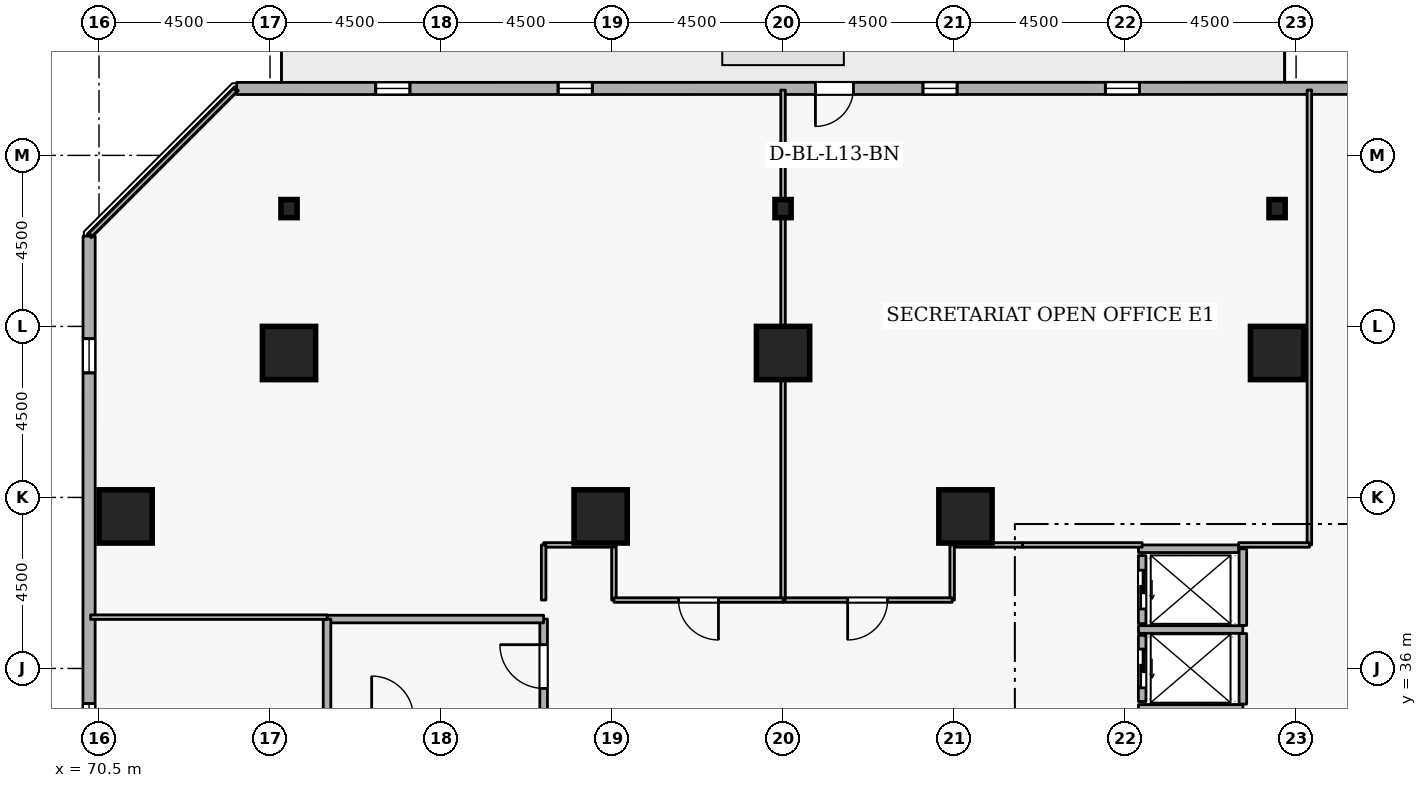
"""IFC4 building model, lengths in metres.
Left out: names, types, materials, properties, quantities, classifications, styles, units other than length and angle.
Written with IfcOpenShell. Run it as: python <this file> out.ifc"""

import sys

from ifc_helpers import new_model, si_unit, direction, frame, frame_2d, origin, origin_2d, place, context, subcontext, project, spatial, rectangle, i_section, extrude, element, fill, save


model = new_model("IFC4")
c1 = context("Model", 3, precision=1e-05, world=origin(), true_north=direction((0.0, 1.0)))
c2 = subcontext(c1, "Body", "Model", "MODEL_VIEW")
j1 = project(units=[si_unit("LENGTHUNIT", "METRE"), si_unit("PLANEANGLEUNIT", "RADIAN")], contexts=[c1])
p1 = place(None, origin())
s1 = spatial("IfcSite", under=j1, at=p1, CompositionType="ELEMENT")
p2 = place(p1, origin())
s2 = spatial("IfcBuilding", under=s1, at=p2, CompositionType="ELEMENT")
p3 = place(p2, frame((0.0, 0.0, 53.7)))
s3 = spatial("IfcBuildingStorey", under=s2, at=p3, CompositionType="ELEMENT", Elevation=53.7)
for number, where, z_axis, x_axis in (
    (1, (101.5, 44.3, 0.0), (0.0, 0.0, 1.0), (1.0, 0.0, 0.0)),
    (2, (88.5, 44.3, 0.0), (0.0, 0.0, 1.0), (1.0, 0.0, 0.0)),
    (3, (75.5, 44.3, 0.0), (0.0, 0.0, 1.0), (1.0, 0.0, 0.0)),
    (4, (71.2, 40.0, 0.0), (0.0, 0.0, 1.0), (1.0, 0.0, 0.0)),
    (5, (93.3, 40.0, 0.0), (0.0, 0.0, 1.0), (1.0, 0.0, 0.0)),
    (6, (83.7, 40.0, 0.0), (0.0, 0.0, 1.0), (1.0, 0.0, 0.0)),
):
    element("IfcColumn", number, at=place(p3, frame(where, z_axis=z_axis, x_axis=x_axis)), inside=s3, PredefinedType="COLUMN", context=c2, shape_type="SweptSolid", body=[
        extrude(rectangle(XDim=1.4, YDim=1.4, at=origin_2d()), origin(), (0.0, 0.0, 1.0), 3.6),
    ])
for number, where, z_axis, x_axis in (
    (7, (101.5, 48.1, 0.0), (0.0, 0.0, 1.0), (1.0, 0.0, 0.0)),
    (8, (88.5, 48.1, 0.0), (0.0, 0.0, 1.0), (1.0, 0.0, 0.0)),
    (9, (75.5, 48.1, 0.0), (0.0, 0.0, 1.0), (1.0, 0.0, 0.0)),
):
    element("IfcColumn", number, at=place(p3, frame(where, z_axis=z_axis, x_axis=x_axis)), inside=s3, PredefinedType="COLUMN", context=c2, shape_type="SweptSolid", body=[
        extrude(i_section(OverallWidth=0.424, OverallDepth=0.475, WebThickness=0.048, FlangeThickness=0.077, FilletRadius=0.015, at=origin_2d()), origin(), (0.0, 0.0, 1.0), 3.6),
    ])
p4 = place(p3, frame((110.181, 51.265, 0.0), z_axis=(0.0, 0.0, 1.0), x_axis=(-0.999999992574, -0.000121872777, 0.0)))
e10 = element("IfcWall", 10, at=p4, inside=s3, PredefinedType="STANDARD", context=c2, shape_type="SweptSolid", body=[
    extrude(rectangle(XDim=36.058, YDim=0.32, at=frame_2d((18.029, 0.0))), origin(), (0.0, 0.0, 1.0), 2.7),
])
p5 = place(p4, frame((19.829, 0.0, 0.0)))
e11 = element("IfcOpeningElement", 11, at=p5, cuts=e10, PredefinedType="OPENING", context=c2, shape_type="SweptSolid", body=[
    extrude(rectangle(XDim=1.0, YDim=2.08, at=frame_2d((0.5, 1.04))), frame((0.0, 0.17, 0.0), z_axis=(0.0, -1.0, 0.0), x_axis=(1.0, 0.0, 0.0)), (0.0, 0.0, 1.0), 0.34),
])
p6 = place(p4, frame((2.7, 0.0, 0.72)))
e12 = element("IfcOpeningElement", 12, at=p6, cuts=e10, PredefinedType="OPENING", context=c2, shape_type="SweptSolid", body=[
    extrude(rectangle(XDim=0.9, YDim=1.75, at=frame_2d((0.45, 0.875))), frame((0.0, 0.17, 0.0), z_axis=(0.0, -1.0, 0.0), x_axis=(1.0, 0.0, 0.0)), (0.0, 0.0, 1.0), 0.34),
])
p7 = place(p4, frame((12.3, 0.0, 0.72)))
e13 = element("IfcOpeningElement", 13, at=p7, cuts=e10, PredefinedType="OPENING", context=c2, shape_type="SweptSolid", body=[
    extrude(rectangle(XDim=0.9, YDim=1.75, at=frame_2d((0.45, 0.875))), frame((0.0, 0.17, 0.0), z_axis=(0.0, -1.0, 0.0), x_axis=(1.0, 0.0, 0.0)), (0.0, 0.0, 1.0), 0.34),
])
p8 = place(p4, frame((17.1, 0.0, 0.72)))
e14 = element("IfcOpeningElement", 14, at=p8, cuts=e10, PredefinedType="OPENING", context=c2, shape_type="SweptSolid", body=[
    extrude(rectangle(XDim=0.9, YDim=1.75, at=frame_2d((0.45, 0.875))), frame((0.0, 0.17, 0.0), z_axis=(0.0, -1.0, 0.0), x_axis=(1.0, 0.0, 0.0)), (0.0, 0.0, 1.0), 0.34),
])
p9 = place(p4, frame((26.7, 0.0, 0.72)))
e15 = element("IfcOpeningElement", 15, at=p9, cuts=e10, PredefinedType="OPENING", context=c2, shape_type="SweptSolid", body=[
    extrude(rectangle(XDim=0.9, YDim=1.75, at=frame_2d((0.45, 0.875))), frame((0.0, 0.17, 0.0), z_axis=(0.0, -1.0, 0.0), x_axis=(1.0, 0.0, 0.0)), (0.0, 0.0, 1.0), 0.34),
])
p10 = place(p4, frame((31.5, 0.0, 0.72)))
e16 = element("IfcOpeningElement", 16, at=p10, cuts=e10, PredefinedType="OPENING", context=c2, shape_type="SweptSolid", body=[
    extrude(rectangle(XDim=0.9, YDim=1.75, at=frame_2d((0.45, 0.875))), frame((0.0, 0.17, 0.0), z_axis=(0.0, -1.0, 0.0), x_axis=(1.0, 0.0, 0.0)), (0.0, 0.0, 1.0), 0.34),
])
p11 = place(p3, frame((70.24, 47.377, 0.0), z_axis=(0.0, 0.0, 1.0), x_axis=(-0.000121872777, -0.999999992574, 0.0)))
e17 = element("IfcWall", 17, at=p11, inside=s3, PredefinedType="STANDARD", context=c2, shape_type="SweptSolid", body=[
    extrude(rectangle(XDim=36.058, YDim=0.32, at=frame_2d((18.029, 0.0))), origin(), (0.0, 0.0, 1.0), 2.7),
])
p12 = place(p11, frame((2.7, 0.0, 0.72)))
e18 = element("IfcOpeningElement", 18, at=p12, cuts=e17, PredefinedType="OPENING", context=c2, shape_type="SweptSolid", body=[
    extrude(rectangle(XDim=0.9, YDim=1.75, at=frame_2d((0.45, 0.875))), frame((0.0, 0.17, 0.0), z_axis=(0.0, -1.0, 0.0), x_axis=(1.0, 0.0, 0.0)), (0.0, 0.0, 1.0), 0.34),
])
p13 = place(p11, frame((12.3, 0.0, 0.72)))
e19 = element("IfcOpeningElement", 19, at=p13, cuts=e17, PredefinedType="OPENING", context=c2, shape_type="SweptSolid", body=[
    extrude(rectangle(XDim=0.9, YDim=1.75, at=frame_2d((0.45, 0.875))), frame((0.0, 0.17, 0.0), z_axis=(0.0, -1.0, 0.0), x_axis=(1.0, 0.0, 0.0)), (0.0, 0.0, 1.0), 0.34),
])
p14 = place(p11, frame((17.1, 0.0, 0.72)))
e20 = element("IfcOpeningElement", 20, at=p14, cuts=e17, PredefinedType="OPENING", context=c2, shape_type="SweptSolid", body=[
    extrude(rectangle(XDim=0.9, YDim=1.75, at=frame_2d((0.45, 0.875))), frame((0.0, 0.17, 0.0), z_axis=(0.0, -1.0, 0.0), x_axis=(1.0, 0.0, 0.0)), (0.0, 0.0, 1.0), 0.34),
])
p15 = place(p11, frame((21.9, 0.0, 0.72)))
e21 = element("IfcOpeningElement", 21, at=p15, cuts=e17, PredefinedType="OPENING", context=c2, shape_type="SweptSolid", body=[
    extrude(rectangle(XDim=0.9, YDim=1.75, at=frame_2d((0.45, 0.875))), frame((0.0, 0.17, 0.0), z_axis=(0.0, -1.0, 0.0), x_axis=(1.0, 0.0, 0.0)), (0.0, 0.0, 1.0), 0.34),
])
p16 = place(p11, frame((26.7, 0.0, 0.72)))
e22 = element("IfcOpeningElement", 22, at=p16, cuts=e17, PredefinedType="OPENING", context=c2, shape_type="SweptSolid", body=[
    extrude(rectangle(XDim=0.9, YDim=1.75, at=frame_2d((0.45, 0.875))), frame((0.0, 0.17, 0.0), z_axis=(0.0, -1.0, 0.0), x_axis=(1.0, 0.0, 0.0)), (0.0, 0.0, 1.0), 0.34),
])
p17 = place(p3, frame((97.95, 36.87, 0.0), z_axis=(0.0, 0.0, 1.0), x_axis=(0.0, -1.0, 0.0)))
e23 = element("IfcWall", 23, at=p17, inside=s3, PredefinedType="STANDARD", context=c2, shape_type="SweptSolid", body=[
    extrude(rectangle(XDim=1.74, YDim=0.2, at=frame_2d((0.87, 0.0))), origin(), (0.0, 0.0, 1.0), 3.34),
])
p18 = place(p17, frame((0.36, 0.0, 0.0)))
e24 = element("IfcOpeningElement", 24, at=p18, cuts=e23, PredefinedType="OPENING", context=c2, shape_type="SweptSolid", body=[
    extrude(rectangle(XDim=1.02, YDim=2.06, at=frame_2d((0.51, 1.03))), frame((0.0, 0.11, 0.0), z_axis=(0.0, -1.0, 0.0), x_axis=(1.0, 0.0, 0.0)), (0.0, 0.0, 1.0), 0.22),
])
p19 = place(p3, frame((97.95, 38.97, 0.0), z_axis=(0.0, 0.0, 1.0), x_axis=(0.0, -1.0, 0.0)))
e25 = element("IfcWall", 25, at=p19, inside=s3, PredefinedType="STANDARD", context=c2, shape_type="SweptSolid", body=[
    extrude(rectangle(XDim=1.79, YDim=0.2, at=frame_2d((0.895, 0.0))), origin(), (0.0, 0.0, 1.0), 3.34),
])
p20 = place(p19, frame((0.385, 0.0, 0.0)))
e26 = element("IfcOpeningElement", 26, at=p20, cuts=e25, PredefinedType="OPENING", context=c2, shape_type="SweptSolid", body=[
    extrude(rectangle(XDim=1.02, YDim=2.06, at=frame_2d((0.51, 1.03))), frame((0.0, 0.11, 0.0), z_axis=(0.0, -1.0, 0.0), x_axis=(1.0, 0.0, 0.0)), (0.0, 0.0, 1.0), 0.22),
])
for number, where, z_axis, x_axis in (
    (27, (97.852, 37.025, 0.0), (0.0, 0.0, 1.0), (1.0, 0.0, 0.0)),
    (28, (97.852, 34.95, 0.0), (0.0, 0.0, 1.0), (1.0, 0.0, 0.0)),
):
    element("IfcWall", number, at=place(p3, frame(where, z_axis=z_axis, x_axis=x_axis)), inside=s3, PredefinedType="STANDARD", context=c2, shape_type="SweptSolid", body=[
        extrude(rectangle(XDim=2.746, YDim=0.2, at=frame_2d((1.373, 0.0))), origin(), (0.0, 0.0, 1.0), 3.34),
    ])
p21 = place(p3, frame((100.6, 35.062, 0.0), z_axis=(0.0, 0.0, 1.0), x_axis=(0.0, 1.0, 0.0)))
e29 = element("IfcWall", 29, at=p21, inside=s3, PredefinedType="STANDARD", context=c2, shape_type="SweptSolid", body=[
    extrude(rectangle(XDim=1.856, YDim=0.2, at=frame_2d((0.928, 0.0))), origin(), (0.0, 0.0, 1.0), 3.34),
])
p22 = place(p3, frame((100.6, 37.132, 0.0), z_axis=(0.0, 0.0, 1.0), x_axis=(0.0, 1.0, 0.0)))
e30 = element("IfcWall", 30, at=p22, inside=s3, PredefinedType="STANDARD", context=c2, shape_type="SweptSolid", body=[
    extrude(rectangle(XDim=2.016, YDim=0.2, at=frame_2d((1.008, 0.0))), origin(), (0.0, 0.0, 1.0), 3.34),
])
p23 = place(p3, frame((97.852, 39.15, 0.0), z_axis=(0.0, 0.0, 1.0), x_axis=(1.0, 0.0, 0.0)))
e31 = element("IfcWall", 31, at=p23, inside=s3, PredefinedType="STANDARD", context=c2, shape_type="SweptSolid", body=[
    extrude(rectangle(XDim=2.636, YDim=0.2, at=frame_2d((1.318, 0.0))), origin(), (0.0, 0.0, 1.0), 3.34),
])
p24 = place(p3, frame((82.2, 34.8, 0.0), z_axis=(0.0, 0.0, 1.0), x_axis=(0.0, 1.0, 0.0)))
e32 = element("IfcWall", 32, at=p24, inside=s3, PredefinedType="STANDARD", context=c2, shape_type="SweptSolid", body=[
    extrude(rectangle(XDim=2.5, YDim=0.2, at=frame_2d((1.25, 0.0))), origin(), (0.0, 0.0, 1.0), 3.34),
])
p25 = place(p24, frame((0.675, 0.0, 0.0)))
e33 = element("IfcOpeningElement", 33, at=p25, cuts=e32, PredefinedType="OPENING", context=c2, shape_type="SweptSolid", body=[
    extrude(rectangle(XDim=1.15, YDim=2.1, at=frame_2d((0.575, 1.05))), frame((0.0, 0.11, 0.0), z_axis=(0.0, -1.0, 0.0), x_axis=(1.0, 0.0, 0.0)), (0.0, 0.0, 1.0), 0.22),
])
p26 = place(p3, frame((82.2, 37.3, 0.0), z_axis=(0.0, 0.0, 1.0), x_axis=(-1.0, 0.0, 0.0)))
e34 = element("IfcWall", 34, at=p26, inside=s3, PredefinedType="STANDARD", context=c2, shape_type="SweptSolid", body=[
    extrude(rectangle(XDim=5.7, YDim=0.2, at=frame_2d((2.85, 0.0))), origin(), (0.0, 0.0, 1.0), 3.34),
])
p27 = place(p3, frame((76.5, 37.3, 0.0), z_axis=(0.0, 0.0, 1.0), x_axis=(0.0, -1.0, 0.0)))
e35 = element("IfcWall", 35, at=p27, inside=s3, PredefinedType="STANDARD", context=c2, shape_type="SweptSolid", body=[
    extrude(rectangle(XDim=2.5, YDim=0.2, at=frame_2d((1.25, 0.0))), origin(), (0.0, 0.0, 1.0), 3.34),
])
p28 = place(p3, frame((97.95, 39.25, 0.0), z_axis=(0.0, 0.0, 1.0), x_axis=(-1.0, 0.0, 0.0)))
e36 = element("IfcWall", 36, at=p28, inside=s3, PredefinedType="PARTITIONING", context=c2, shape_type="SweptSolid", body=[
    extrude(rectangle(XDim=3.15, YDim=0.12, at=frame_2d((1.575, 0.0))), origin(), (0.0, 0.0, 1.0), 3.34),
])
p29 = place(p3, frame((94.8, 39.25, 0.0), z_axis=(0.0, 0.0, 1.0), x_axis=(-1.0, 0.0, 0.0)))
e37 = element("IfcWall", 37, at=p29, inside=s3, PredefinedType="PARTITIONING", context=c2, shape_type="SweptSolid", body=[
    extrude(rectangle(XDim=1.85, YDim=0.12, at=frame_2d((0.925, 0.0))), origin(), (0.0, 0.0, 1.0), 3.34),
])
p30 = place(p3, frame((92.95, 39.25, 0.0), z_axis=(0.0, 0.0, 1.0), x_axis=(0.0, -1.0, 0.0)))
e38 = element("IfcWall", 38, at=p30, inside=s3, PredefinedType="PARTITIONING", context=c2, shape_type="SweptSolid", body=[
    extrude(rectangle(XDim=1.45, YDim=0.12, at=frame_2d((0.725, 0.0))), origin(), (0.0, 0.0, 1.0), 3.34),
])
p31 = place(p3, frame((92.95, 37.8, 0.0), z_axis=(0.0, 0.0, 1.0), x_axis=(-1.0, 0.0, 0.0)))
e39 = element("IfcWall", 39, at=p31, inside=s3, PredefinedType="PARTITIONING", context=c2, shape_type="SweptSolid", body=[
    extrude(rectangle(XDim=4.45, YDim=0.12, at=frame_2d((2.225, 0.0))), origin(), (0.0, 0.0, 1.0), 3.34),
])
p32 = place(p31, frame((1.7, 0.0, 0.0)))
e40 = element("IfcOpeningElement", 40, at=p32, cuts=e39, PredefinedType="OPENING", context=c2, shape_type="SweptSolid", body=[
    extrude(rectangle(XDim=1.05, YDim=2.1, at=frame_2d((0.525, 1.05))), frame((0.0, 0.07, 0.0), z_axis=(0.0, -1.0, 0.0), x_axis=(1.0, 0.0, 0.0)), (0.0, 0.0, 1.0), 0.14),
])
p33 = place(p3, frame((88.5, 37.8, 0.0), z_axis=(0.0, 0.0, 1.0), x_axis=(0.0, 1.0, 0.0)))
e41 = element("IfcWall", 41, at=p33, inside=s3, PredefinedType="PARTITIONING", context=c2, shape_type="SweptSolid", body=[
    extrude(rectangle(XDim=13.42, YDim=0.12, at=frame_2d((6.71, 0.0))), origin(), (0.0, 0.0, 1.0), 2.932),
])
p34 = place(p3, frame((102.35, 51.22, 0.0), z_axis=(0.0, 0.0, 1.0), x_axis=(0.0, -1.0, 0.0)))
e42 = element("IfcWall", 42, at=p34, inside=s3, PredefinedType="PARTITIONING", context=c2, shape_type="SweptSolid", body=[
    extrude(rectangle(XDim=11.97, YDim=0.12, at=frame_2d((5.985, 0.0))), origin(), (0.0, 0.0, 1.0), 3.34),
])
p35 = place(p3, frame((102.35, 39.25, 0.0), z_axis=(0.0, 0.0, 1.0), x_axis=(-1.0, 0.0, 0.0)))
e43 = element("IfcWall", 43, at=p35, inside=s3, PredefinedType="PARTITIONING", context=c2, shape_type="SweptSolid", body=[
    extrude(rectangle(XDim=1.862, YDim=0.12, at=frame_2d((0.931, 0.0))), origin(), (0.0, 0.0, 1.0), 3.34),
])
p36 = place(p3, frame((84.05, 37.8, 0.0), z_axis=(0.0, 0.0, 1.0), x_axis=(0.0, 1.0, 0.0)))
e44 = element("IfcWall", 44, at=p36, inside=s3, PredefinedType="PARTITIONING", context=c2, shape_type="SweptSolid", body=[
    extrude(rectangle(XDim=1.45, YDim=0.12, at=frame_2d((0.725, 0.0))), origin(), (0.0, 0.0, 1.0), 3.34),
])
p37 = place(p3, frame((84.05, 39.25, 0.0), z_axis=(0.0, 0.0, 1.0), x_axis=(-1.0, 0.0, 0.0)))
e45 = element("IfcWall", 45, at=p37, inside=s3, PredefinedType="PARTITIONING", context=c2, shape_type="SweptSolid", body=[
    extrude(rectangle(XDim=1.85, YDim=0.12, at=frame_2d((0.925, 0.0))), origin(), (0.0, 0.0, 1.0), 3.34),
])
p38 = place(p3, frame((82.2, 39.25, 0.0), z_axis=(0.0, 0.0, 1.0), x_axis=(0.0, -1.0, 0.0)))
e46 = element("IfcWall", 46, at=p38, inside=s3, PredefinedType="PARTITIONING", context=c2, shape_type="SweptSolid", body=[
    extrude(rectangle(XDim=1.45, YDim=0.12, at=frame_2d((0.725, 0.0))), origin(), (0.0, 0.0, 1.0), 3.34),
])
p39 = place(p3, frame((76.5, 37.35, 0.0), z_axis=(0.0, 0.0, 1.0), x_axis=(-1.0, 0.0, 0.0)))
e47 = element("IfcWall", 47, at=p39, inside=s3, PredefinedType="PARTITIONING", context=c2, shape_type="SweptSolid", body=[
    extrude(rectangle(XDim=6.22, YDim=0.12, at=frame_2d((3.11, 0.0))), origin(), (0.0, 0.0, 1.0), 3.34),
])
p40 = place(p3, frame((70.28, 47.417, 0.0), z_axis=(0.0, 0.0, 1.0), x_axis=(0.707106781187, 0.707106781187, 0.0)))
e48 = element("IfcWall", 48, at=p40, inside=s3, PredefinedType="PARTITIONING", context=c2, shape_type="SweptSolid", body=[
    extrude(rectangle(XDim=5.379, YDim=0.12, at=frame_2d((2.689, 0.0))), origin(), (0.0, 0.0, 1.0), 3.34),
])
p41 = place(p3, frame((88.5, 37.8, 0.0), z_axis=(0.0, 0.0, 1.0), x_axis=(-1.0, 0.0, 0.0)))
e49 = element("IfcWall", 49, at=p41, inside=s3, PredefinedType="PARTITIONING", context=c2, shape_type="SweptSolid", body=[
    extrude(rectangle(XDim=4.45, YDim=0.12, at=frame_2d((2.225, 0.0))), origin(), (0.0, 0.0, 1.0), 3.34),
])
p42 = place(p41, frame((1.7, 0.0, 0.0)))
e50 = element("IfcOpeningElement", 50, at=p42, cuts=e49, PredefinedType="OPENING", context=c2, shape_type="SweptSolid", body=[
    extrude(rectangle(XDim=1.05, YDim=2.1, at=frame_2d((0.525, 1.05))), frame((0.0, 0.07, 0.0), z_axis=(0.0, -1.0, 0.0), x_axis=(1.0, 0.0, 0.0)), (0.0, 0.0, 1.0), 0.14),
])
p43 = place(p5, origin())
e51 = element("IfcDoor", 51, at=p43, inside=s3, OperationType="SINGLE_SWING_RIGHT", PredefinedType="DOOR", context=c2, shape_type="SweptSolid", body=[
    extrude(rectangle(XDim=1.0, YDim=2.08, at=frame_2d((0.5, 1.04))), frame((0.0, 0.025, 0.0), z_axis=(0.0, -1.0, 0.0), x_axis=(1.0, 0.0, 0.0)), (0.0, 0.0, 1.0), 0.05),
])
fill(e11, e51)
p44 = place(p7, origin())
e52 = element("IfcWindow", 52, at=p44, inside=s3, PartitioningType="SINGLE_PANEL", PredefinedType="WINDOW", context=c2, shape_type="SweptSolid", body=[
    extrude(rectangle(XDim=0.9, YDim=1.75, at=frame_2d((0.45, 0.875))), frame((0.0, 0.03, 0.0), z_axis=(0.0, -1.0, 0.0), x_axis=(1.0, 0.0, 0.0)), (0.0, 0.0, 1.0), 0.06),
])
fill(e13, e52)
p45 = place(p8, origin())
e53 = element("IfcWindow", 53, at=p45, inside=s3, PartitioningType="SINGLE_PANEL", PredefinedType="WINDOW", context=c2, shape_type="SweptSolid", body=[
    extrude(rectangle(XDim=0.9, YDim=1.75, at=frame_2d((0.45, 0.875))), frame((0.0, 0.03, 0.0), z_axis=(0.0, -1.0, 0.0), x_axis=(1.0, 0.0, 0.0)), (0.0, 0.0, 1.0), 0.06),
])
fill(e14, e53)
p46 = place(p9, origin())
e54 = element("IfcWindow", 54, at=p46, inside=s3, PartitioningType="SINGLE_PANEL", PredefinedType="WINDOW", context=c2, shape_type="SweptSolid", body=[
    extrude(rectangle(XDim=0.9, YDim=1.75, at=frame_2d((0.45, 0.875))), frame((0.0, 0.03, 0.0), z_axis=(0.0, -1.0, 0.0), x_axis=(1.0, 0.0, 0.0)), (0.0, 0.0, 1.0), 0.06),
])
fill(e15, e54)
p47 = place(p10, origin())
e55 = element("IfcWindow", 55, at=p47, inside=s3, PartitioningType="SINGLE_PANEL", PredefinedType="WINDOW", context=c2, shape_type="SweptSolid", body=[
    extrude(rectangle(XDim=0.9, YDim=1.75, at=frame_2d((0.45, 0.875))), frame((0.0, 0.03, 0.0), z_axis=(0.0, -1.0, 0.0), x_axis=(1.0, 0.0, 0.0)), (0.0, 0.0, 1.0), 0.06),
])
fill(e16, e55)
p48 = place(p12, origin())
e56 = element("IfcWindow", 56, at=p48, inside=s3, PartitioningType="SINGLE_PANEL", PredefinedType="WINDOW", context=c2, shape_type="SweptSolid", body=[
    extrude(rectangle(XDim=0.9, YDim=1.75, at=frame_2d((0.45, 0.875))), frame((0.0, 0.03, 0.0), z_axis=(0.0, -1.0, 0.0), x_axis=(1.0, 0.0, 0.0)), (0.0, 0.0, 1.0), 0.06),
])
fill(e18, e56)
p49 = place(p13, origin())
e57 = element("IfcWindow", 57, at=p49, inside=s3, PartitioningType="SINGLE_PANEL", PredefinedType="WINDOW", context=c2, shape_type="SweptSolid", body=[
    extrude(rectangle(XDim=0.9, YDim=1.75, at=frame_2d((0.45, 0.875))), frame((0.0, 0.03, 0.0), z_axis=(0.0, -1.0, 0.0), x_axis=(1.0, 0.0, 0.0)), (0.0, 0.0, 1.0), 0.06),
])
fill(e19, e57)
p50 = place(p18, origin())
e58 = element("IfcDoor", 58, at=p50, inside=s3, OperationType="SLIDING_TO_LEFT", PredefinedType="DOOR", context=c2, shape_type="SweptSolid", body=[
    extrude(rectangle(XDim=1.02, YDim=2.06, at=frame_2d((0.51, 1.03))), frame((0.0, 0.025, 0.0), z_axis=(0.0, -1.0, 0.0), x_axis=(1.0, 0.0, 0.0)), (0.0, 0.0, 1.0), 0.05),
])
fill(e24, e58)
p51 = place(p20, origin())
e59 = element("IfcDoor", 59, at=p51, inside=s3, OperationType="SLIDING_TO_LEFT", PredefinedType="DOOR", context=c2, shape_type="SweptSolid", body=[
    extrude(rectangle(XDim=1.02, YDim=2.06, at=frame_2d((0.51, 1.03))), frame((0.0, 0.025, 0.0), z_axis=(0.0, -1.0, 0.0), x_axis=(1.0, 0.0, 0.0)), (0.0, 0.0, 1.0), 0.05),
])
fill(e26, e59)
p52 = place(p25, origin())
e60 = element("IfcDoor", 60, at=p52, inside=s3, OperationType="SINGLE_SWING_RIGHT", PredefinedType="DOOR", context=c2, shape_type="SweptSolid", body=[
    extrude(rectangle(XDim=1.15, YDim=2.1, at=frame_2d((0.575, 1.05))), frame((0.0, 0.025, 0.0), z_axis=(0.0, -1.0, 0.0), x_axis=(1.0, 0.0, 0.0)), (0.0, 0.0, 1.0), 0.05),
])
fill(e33, e60)
p53 = place(p32, origin())
e61 = element("IfcDoor", 61, at=p53, inside=s3, OperationType="SINGLE_SWING_RIGHT", PredefinedType="DOOR", context=c2, shape_type="SweptSolid", body=[
    extrude(rectangle(XDim=1.05, YDim=2.1, at=frame_2d((0.525, 1.05))), frame((0.0, 0.025, 0.0), z_axis=(0.0, -1.0, 0.0), x_axis=(1.0, 0.0, 0.0)), (0.0, 0.0, 1.0), 0.05),
])
fill(e40, e61)
p54 = place(p42, origin())
e62 = element("IfcDoor", 62, at=p54, inside=s3, OperationType="SINGLE_SWING_LEFT", PredefinedType="DOOR", context=c2, shape_type="SweptSolid", body=[
    extrude(rectangle(XDim=1.05, YDim=2.1, at=frame_2d((0.525, 1.05))), frame((0.0, 0.025, 0.0), z_axis=(0.0, -1.0, 0.0), x_axis=(1.0, 0.0, 0.0)), (0.0, 0.0, 1.0), 0.05),
])
fill(e50, e62)
save(model, sys.argv[1])
